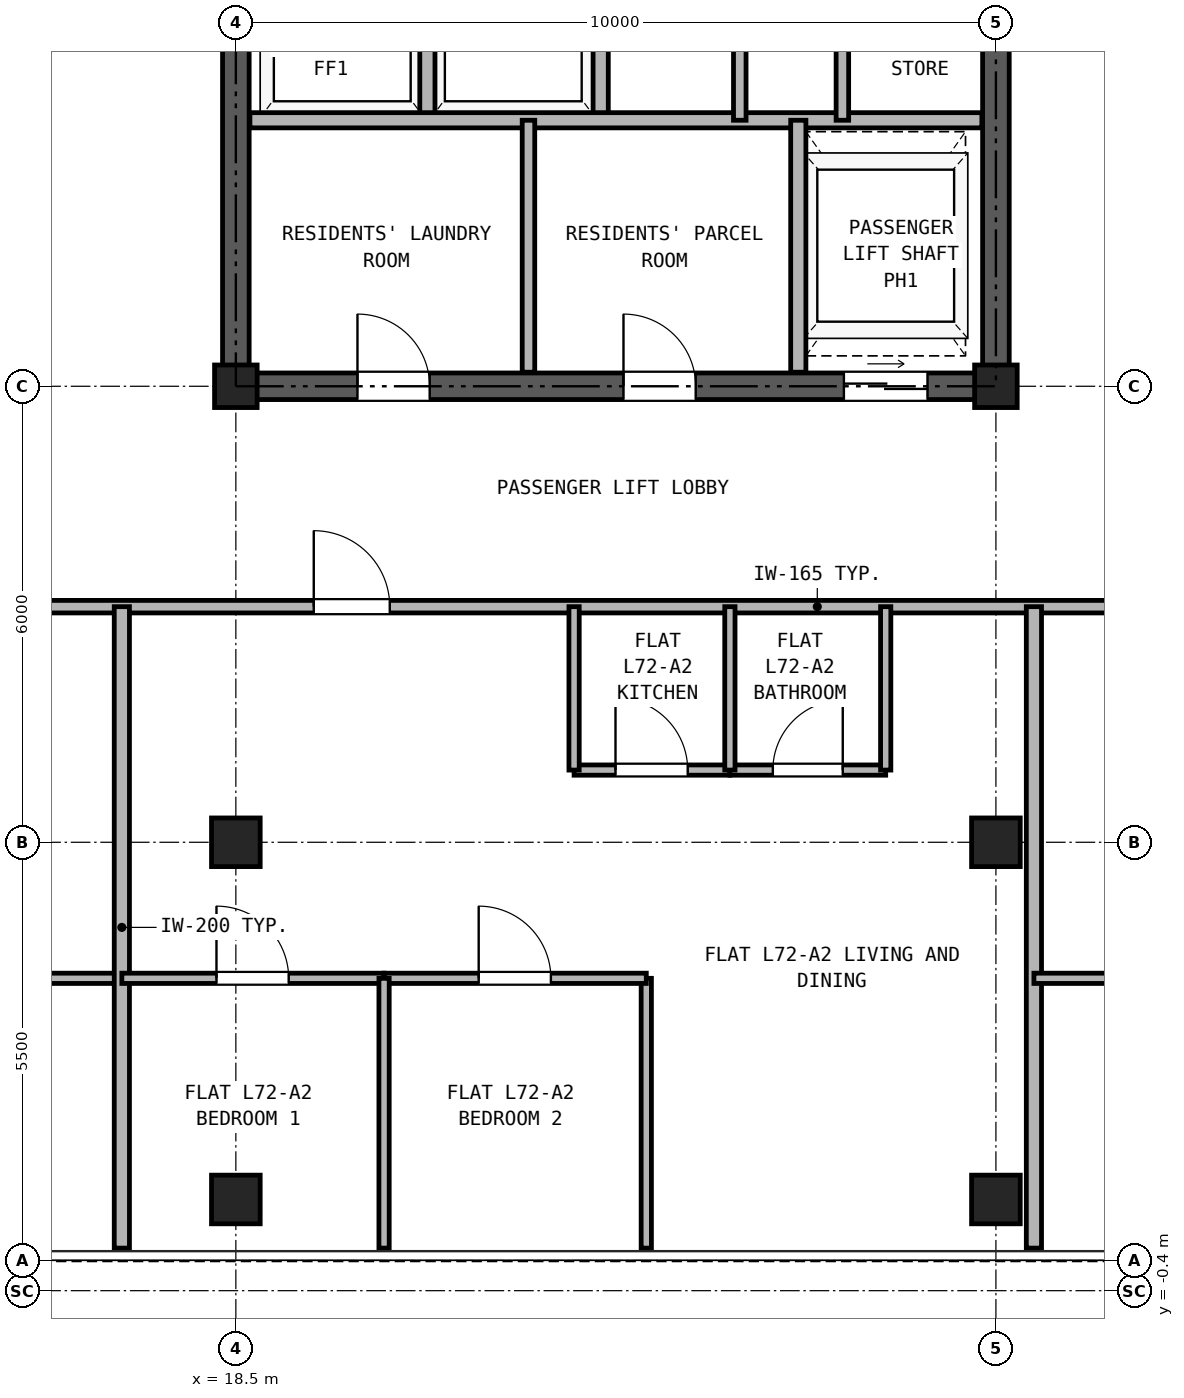
"""IFC4 building model, lengths in metres.
Left out: names, types, materials, properties, quantities, classifications, styles, units other than length and angle.
Written with IfcOpenShell. Run it as: python <this file> out.ifc"""

import sys

from ifc_helpers import new_model, si_unit, direction, frame, frame_2d, origin, origin_2d, place, context, subcontext, project, spatial, rectangle, hollow_rectangle, extrude, source, transform, mapped, element, fill, save


model = new_model("IFC4")
c1 = context("Model", 3, precision=1e-05, world=origin(), true_north=direction((0.0, 1.0)))
c2 = subcontext(c1, "Body", "Model", "MODEL_VIEW")
j1 = project(units=[si_unit("LENGTHUNIT", "METRE"), si_unit("PLANEANGLEUNIT", "RADIAN")], contexts=[c1])
p1 = place(None, origin())
s1 = spatial("IfcSite", under=j1, at=p1, CompositionType="ELEMENT")
p2 = place(p1, origin())
s2 = spatial("IfcBuilding", under=s1, at=p2, CompositionType="ELEMENT")
p3 = place(p2, frame((0.0, 0.0, 252.1)))
s3 = spatial("IfcBuildingStorey", under=s2, at=p3, CompositionType="ELEMENT", Elevation=252.1)
m1 = source(origin(), c2, "Body", "SweptSolid", [
    extrude(hollow_rectangle(XDim=0.64, YDim=0.64, WallThickness=0.035, at=origin_2d()), origin(), (0.0, 0.0, 1.0), 2.98),
])
for number, where, z_axis, x_axis in (
    (1, (18.5, 0.8, 0.0), (0.0, 0.0, 1.0), (1.0, 0.0, 0.0)),
    (2, (28.5, 0.8, 0.0), (0.0, 0.0, 1.0), (1.0, 0.0, 0.0)),
    (3, (18.5, 5.5, 0.0), (0.0, 0.0, 1.0), (1.0, 0.0, 0.0)),
):
    element("IfcColumn", number, at=place(p3, frame(where, z_axis=z_axis, x_axis=x_axis)), inside=s3, PredefinedType="COLUMN", context=c2, shape_type="MappedRepresentation", body=[
        mapped(m1, transform((0.0, 0.0, 0.0), x_axis=(1.0, 0.0, 0.0), y_axis=(0.0, 1.0, 0.0), z_axis=(0.0, 0.0, 1.0), scale=1.0)),
    ])
m2 = source(origin(), c2, "Body", "SweptSolid", [
    extrude(hollow_rectangle(XDim=0.56, YDim=0.56, WallThickness=0.03, at=origin_2d()), origin(), (0.0, 0.0, 1.0), 2.98),
])
p4 = place(p3, frame((18.5, 11.5, 0.0), z_axis=(0.0, 0.0, 1.0), x_axis=(1.0, 0.0, 0.0)))
e4 = element("IfcColumn", 4, at=p4, inside=s3, PredefinedType="COLUMN", context=c2, shape_type="MappedRepresentation", body=[
    mapped(m2, transform((0.0, 0.0, 0.0), x_axis=(1.0, 0.0, 0.0), y_axis=(0.0, 1.0, 0.0), z_axis=(0.0, 0.0, 1.0), scale=1.0)),
])
p5 = place(p3, frame((28.5, 5.5, 0.0), z_axis=(0.0, 0.0, 1.0), x_axis=(1.0, 0.0, 0.0)))
e5 = element("IfcColumn", 5, at=p5, inside=s3, PredefinedType="COLUMN", context=c2, shape_type="MappedRepresentation", body=[
    mapped(m1, transform((0.0, 0.0, 0.0), x_axis=(1.0, 0.0, 0.0), y_axis=(0.0, 1.0, 0.0), z_axis=(0.0, 0.0, 1.0), scale=1.0)),
])
p6 = place(p3, frame((28.5, 11.5, 0.0), z_axis=(0.0, 0.0, 1.0), x_axis=(1.0, 0.0, 0.0)))
e6 = element("IfcColumn", 6, at=p6, inside=s3, PredefinedType="COLUMN", context=c2, shape_type="MappedRepresentation", body=[
    mapped(m2, transform((0.0, 0.0, 0.0), x_axis=(1.0, 0.0, 0.0), y_axis=(0.0, 1.0, 0.0), z_axis=(0.0, 0.0, 1.0), scale=1.0)),
])
p7 = place(p3, frame((18.325, 11.5, 0.0), z_axis=(0.0, 0.0, 1.0), x_axis=(1.0, 0.0, 0.0)))
e7 = element("IfcWall", 7, at=p7, inside=s3, PredefinedType="SHEAR", context=c2, shape_type="SweptSolid", body=[
    extrude(rectangle(XDim=10.35, YDim=0.35, at=frame_2d((5.175, 0.0))), origin(), (0.0, 0.0, 1.0), 2.98),
])
p8 = place(p7, frame((1.775, 0.0, 0.0)))
e8 = element("IfcOpeningElement", 8, at=p8, cuts=e7, PredefinedType="OPENING", context=c2, shape_type="SweptSolid", body=[
    extrude(rectangle(XDim=0.95, YDim=2.15, at=frame_2d((0.475, 1.075))), frame((0.0, 0.185, 0.0), z_axis=(0.0, -1.0, 0.0), x_axis=(1.0, 0.0, 0.0)), (0.0, 0.0, 1.0), 0.37),
])
p9 = place(p7, frame((5.275, 0.0, 0.0)))
e9 = element("IfcOpeningElement", 9, at=p9, cuts=e7, PredefinedType="OPENING", context=c2, shape_type="SweptSolid", body=[
    extrude(rectangle(XDim=0.95, YDim=2.15, at=frame_2d((0.475, 1.075))), frame((0.0, 0.185, 0.0), z_axis=(0.0, -1.0, 0.0), x_axis=(1.0, 0.0, 0.0)), (0.0, 0.0, 1.0), 0.37),
])
p10 = place(p7, frame((8.175, 0.0, 0.0)))
e10 = element("IfcOpeningElement", 10, at=p10, cuts=e7, PredefinedType="OPENING", context=c2, shape_type="SweptSolid", body=[
    extrude(rectangle(XDim=1.1, YDim=2.25, at=frame_2d((0.55, 1.125))), frame((0.0, 0.185, 0.0), z_axis=(0.0, -1.0, 0.0), x_axis=(1.0, 0.0, 0.0)), (0.0, 0.0, 1.0), 0.37),
])
p11 = place(p3, frame((18.5, 11.675, 0.0), z_axis=(0.0, 0.0, 1.0), x_axis=(0.0, 1.0, 0.0)))
e11 = element("IfcWall", 11, at=p11, inside=s3, PredefinedType="SHEAR", context=c2, shape_type="SweptSolid", body=[
    extrude(rectangle(XDim=16.9, YDim=0.35, at=frame_2d((8.45, 0.0))), origin(), (0.0, 0.0, 1.0), 2.98),
])
p12 = place(p11, frame((7.475, 0.0, 0.0)))
e12 = element("IfcOpeningElement", 12, at=p12, cuts=e11, PredefinedType="OPENING", context=c2, shape_type="SweptSolid", body=[
    extrude(rectangle(XDim=1.15, YDim=2.2, at=frame_2d((0.575, 1.1))), frame((0.0, 0.185, 0.0), z_axis=(0.0, -1.0, 0.0), x_axis=(1.0, 0.0, 0.0)), (0.0, 0.0, 1.0), 0.37),
])
p13 = place(p3, frame((28.5, 11.675, 0.0), z_axis=(0.0, 0.0, 1.0), x_axis=(0.0, 1.0, 0.0)))
e13 = element("IfcWall", 13, at=p13, inside=s3, PredefinedType="SHEAR", context=c2, shape_type="SweptSolid", body=[
    extrude(rectangle(XDim=16.9, YDim=0.35, at=frame_2d((8.45, 0.0))), origin(), (0.0, 0.0, 1.0), 2.98),
])
p14 = place(p13, frame((7.475, 0.0, 0.0)))
e14 = element("IfcOpeningElement", 14, at=p14, cuts=e13, PredefinedType="OPENING", context=c2, shape_type="SweptSolid", body=[
    extrude(rectangle(XDim=1.15, YDim=2.2, at=frame_2d((0.575, 1.1))), frame((0.0, 0.185, 0.0), z_axis=(0.0, -1.0, 0.0), x_axis=(1.0, 0.0, 0.0)), (0.0, 0.0, 1.0), 0.37),
])
for number, where, z_axis, x_axis in (
    (15, (21.02, 15.0, 0.0), (0.0, 0.0, 1.0), (0.0, 1.0, 0.0)),
    (16, (23.3, 15.0, 0.0), (0.0, 0.0, 1.0), (0.0, 1.0, 0.0)),
):
    element("IfcWall", number, at=place(p3, frame(where, z_axis=z_axis, x_axis=x_axis)), inside=s3, PredefinedType="PARTITIONING", context=c2, shape_type="SweptSolid", body=[
        extrude(rectangle(XDim=3.0, YDim=0.2, at=frame_2d((1.5, 0.0))), origin(), (0.0, 0.0, 1.0), 2.98),
    ])
p15 = place(p3, frame((18.685, 15.0, 0.0), z_axis=(0.0, 0.0, 1.0), x_axis=(1.0, 0.0, 0.0)))
e17 = element("IfcWall", 17, at=p15, inside=s3, PredefinedType="PARTITIONING", context=c2, shape_type="SweptSolid", body=[
    extrude(rectangle(XDim=9.63, YDim=0.2, at=frame_2d((4.815, 0.0))), origin(), (0.0, 0.0, 1.0), 2.98),
])
p16 = place(p3, frame((25.13, 15.0, 0.0), z_axis=(0.0, 0.0, 1.0), x_axis=(0.0, 1.0, 0.0)))
e18 = element("IfcWall", 18, at=p16, inside=s3, PredefinedType="PARTITIONING", context=c2, shape_type="SweptSolid", body=[
    extrude(rectangle(XDim=3.0, YDim=0.165, at=frame_2d((1.5, 0.0))), origin(), (0.0, 0.0, 1.0), 2.98),
])
p17 = place(p3, frame((26.48, 15.0, 0.0), z_axis=(0.0, 0.0, 1.0), x_axis=(0.0, 1.0, 0.0)))
e19 = element("IfcWall", 19, at=p17, inside=s3, PredefinedType="PARTITIONING", context=c2, shape_type="SweptSolid", body=[
    extrude(rectangle(XDim=3.0, YDim=0.165, at=frame_2d((1.5, 0.0))), origin(), (0.0, 0.0, 1.0), 2.98),
])
p18 = place(p17, frame((1.05, 0.0, 0.0)))
e20 = element("IfcOpeningElement", 20, at=p18, cuts=e19, PredefinedType="OPENING", context=c2, shape_type="SweptSolid", body=[
    extrude(rectangle(XDim=0.9, YDim=2.05, at=frame_2d((0.45, 1.025))), frame((0.0, 0.093, 0.0), z_axis=(0.0, -1.0, 0.0), x_axis=(1.0, 0.0, 0.0)), (0.0, 0.0, 1.0), 0.185),
])
p19 = place(p3, frame((22.35, 11.685, 0.0), z_axis=(0.0, 0.0, 1.0), x_axis=(0.0, 1.0, 0.0)))
e21 = element("IfcWall", 21, at=p19, inside=s3, PredefinedType="PARTITIONING", context=c2, shape_type="SweptSolid", body=[
    extrude(rectangle(XDim=3.315, YDim=0.165, at=frame_2d((1.657, 0.0))), origin(), (0.0, 0.0, 1.0), 2.98),
])
p20 = place(p3, frame((25.9, 11.685, 0.0), z_axis=(0.0, 0.0, 1.0), x_axis=(0.0, 1.0, 0.0)))
e22 = element("IfcWall", 22, at=p20, inside=s3, PredefinedType="PARTITIONING", context=c2, shape_type="SweptSolid", body=[
    extrude(rectangle(XDim=3.315, YDim=0.2, at=frame_2d((1.657, 0.0))), origin(), (0.0, 0.0, 1.0), 2.98),
])
p21 = place(p3, frame((5.36, 8.6, 0.0), z_axis=(0.0, 0.0, 1.0), x_axis=(1.0, 0.0, 0.0)))
e23 = element("IfcWall", 23, at=p21, inside=s3, PredefinedType="PARTITIONING", context=c2, shape_type="SweptSolid", body=[
    extrude(rectangle(XDim=36.28, YDim=0.165, at=frame_2d((18.14, 0.0))), origin(), (0.0, 0.0, 1.0), 2.655),
])
p22 = place(p21, frame((8.365, 0.0, 0.0)))
e24 = element("IfcOpeningElement", 24, at=p22, cuts=e23, PredefinedType="OPENING", context=c2, shape_type="SweptSolid", body=[
    extrude(rectangle(XDim=1.0, YDim=2.15, at=frame_2d((0.5, 1.075))), frame((0.0, 0.093, 0.0), z_axis=(0.0, -1.0, 0.0), x_axis=(1.0, 0.0, 0.0)), (0.0, 0.0, 1.0), 0.185),
])
p23 = place(p21, frame((14.165, 0.0, 0.0)))
e25 = element("IfcOpeningElement", 25, at=p23, cuts=e23, PredefinedType="OPENING", context=c2, shape_type="SweptSolid", body=[
    extrude(rectangle(XDim=1.0, YDim=2.15, at=frame_2d((0.5, 1.075))), frame((0.0, 0.093, 0.0), z_axis=(0.0, -1.0, 0.0), x_axis=(1.0, 0.0, 0.0)), (0.0, 0.0, 1.0), 0.185),
])
p24 = place(p21, frame((26.415, 0.0, 0.0)))
e26 = element("IfcOpeningElement", 26, at=p24, cuts=e23, PredefinedType="OPENING", context=c2, shape_type="SweptSolid", body=[
    extrude(rectangle(XDim=1.0, YDim=2.15, at=frame_2d((0.5, 1.075))), frame((0.0, 0.093, 0.0), z_axis=(0.0, -1.0, 0.0), x_axis=(1.0, 0.0, 0.0)), (0.0, 0.0, 1.0), 0.185),
])
p25 = place(p3, frame((13.55, 3.71, 0.0), z_axis=(0.0, 0.0, 1.0), x_axis=(1.0, 0.0, 0.0)))
e27 = element("IfcWall", 27, at=p25, inside=s3, PredefinedType="PARTITIONING", context=c2, shape_type="SweptSolid", body=[
    extrude(rectangle(XDim=3.45, YDim=0.135, at=frame_2d((1.725, 0.0))), origin(), (0.0, 0.0, 1.0), 2.98),
])
p26 = place(p25, frame((1.245, 0.0, 0.0)))
e28 = element("IfcOpeningElement", 28, at=p26, cuts=e27, PredefinedType="OPENING", context=c2, shape_type="SweptSolid", body=[
    extrude(rectangle(XDim=0.95, YDim=2.15, at=frame_2d((0.475, 1.075))), frame((0.0, 0.077, 0.0), z_axis=(0.0, -1.0, 0.0), x_axis=(1.0, 0.0, 0.0)), (0.0, 0.0, 1.0), 0.155),
])
p27 = place(p3, frame((17.0, 0.16, 0.0), z_axis=(0.0, 0.0, 1.0), x_axis=(0.0, 1.0, 0.0)))
e29 = element("IfcWall", 29, at=p27, inside=s3, PredefinedType="PARTITIONING", context=c2, shape_type="SweptSolid", body=[
    extrude(rectangle(XDim=8.44, YDim=0.2, at=frame_2d((4.22, 0.0))), origin(), (0.0, 0.0, 1.0), 2.98),
])
p28 = place(p3, frame((22.95, 6.45, 0.0), z_axis=(0.0, 0.0, 1.0), x_axis=(1.0, 0.0, 0.0)))
e30 = element("IfcWall", 30, at=p28, inside=s3, PredefinedType="PARTITIONING", context=c2, shape_type="SweptSolid", body=[
    extrude(rectangle(XDim=2.05, YDim=0.135, at=frame_2d((1.025, 0.0))), origin(), (0.0, 0.0, 1.0), 2.98),
])
p29 = place(p28, frame((0.545, 0.0, 0.0)))
e31 = element("IfcOpeningElement", 31, at=p29, cuts=e30, PredefinedType="OPENING", context=c2, shape_type="SweptSolid", body=[
    extrude(rectangle(XDim=0.95, YDim=2.15, at=frame_2d((0.475, 1.075))), frame((0.0, 0.077, 0.0), z_axis=(0.0, -1.0, 0.0), x_axis=(1.0, 0.0, 0.0)), (0.0, 0.0, 1.0), 0.155),
])
p30 = place(p3, frame((25.0, 6.45, 0.0), z_axis=(0.0, 0.0, 1.0), x_axis=(1.0, 0.0, 0.0)))
e32 = element("IfcWall", 32, at=p30, inside=s3, PredefinedType="PARTITIONING", context=c2, shape_type="SweptSolid", body=[
    extrude(rectangle(XDim=2.05, YDim=0.135, at=frame_2d((1.025, 0.0))), origin(), (0.0, 0.0, 1.0), 2.98),
])
p31 = place(p30, frame((0.565, 0.0, 0.0)))
e33 = element("IfcOpeningElement", 33, at=p31, cuts=e32, PredefinedType="OPENING", context=c2, shape_type="SweptSolid", body=[
    extrude(rectangle(XDim=0.92, YDim=2.1, at=frame_2d((0.46, 1.05))), frame((0.0, 0.077, 0.0), z_axis=(0.0, -1.0, 0.0), x_axis=(1.0, 0.0, 0.0)), (0.0, 0.0, 1.0), 0.155),
])
for number, where, z_axis, x_axis in (
    (34, (22.95, 6.45, 0.0), (0.0, 0.0, 1.0), (0.0, 1.0, 0.0)),
    (35, (25.0, 6.45, 0.0), (0.0, 0.0, 1.0), (0.0, 1.0, 0.0)),
    (36, (27.05, 6.45, 0.0), (0.0, 0.0, 1.0), (0.0, 1.0, 0.0)),
):
    element("IfcWall", number, at=place(p3, frame(where, z_axis=z_axis, x_axis=x_axis)), inside=s3, PredefinedType="PARTITIONING", context=c2, shape_type="SweptSolid", body=[
        extrude(rectangle(XDim=2.15, YDim=0.135, at=frame_2d((1.075, 0.0))), origin(), (0.0, 0.0, 1.0), 2.98),
    ])
p32 = place(p3, frame((23.9, 0.16, 0.0), z_axis=(0.0, 0.0, 1.0), x_axis=(0.0, 1.0, 0.0)))
e37 = element("IfcWall", 37, at=p32, inside=s3, PredefinedType="PARTITIONING", context=c2, shape_type="SweptSolid", body=[
    extrude(rectangle(XDim=3.55, YDim=0.135, at=frame_2d((1.775, 0.0))), origin(), (0.0, 0.0, 1.0), 2.98),
])
p33 = place(p3, frame((17.0, 3.71, 0.0), z_axis=(0.0, 0.0, 1.0), x_axis=(1.0, 0.0, 0.0)))
e38 = element("IfcWall", 38, at=p33, inside=s3, PredefinedType="PARTITIONING", context=c2, shape_type="SweptSolid", body=[
    extrude(rectangle(XDim=3.45, YDim=0.135, at=frame_2d((1.725, 0.0))), origin(), (0.0, 0.0, 1.0), 2.98),
])
p34 = place(p33, frame((1.245, 0.0, 0.0)))
e39 = element("IfcOpeningElement", 39, at=p34, cuts=e38, PredefinedType="OPENING", context=c2, shape_type="SweptSolid", body=[
    extrude(rectangle(XDim=0.95, YDim=2.15, at=frame_2d((0.475, 1.075))), frame((0.0, 0.077, 0.0), z_axis=(0.0, -1.0, 0.0), x_axis=(1.0, 0.0, 0.0)), (0.0, 0.0, 1.0), 0.155),
])
p35 = place(p3, frame((20.45, 3.71, 0.0), z_axis=(0.0, 0.0, 1.0), x_axis=(1.0, 0.0, 0.0)))
e40 = element("IfcWall", 40, at=p35, inside=s3, PredefinedType="PARTITIONING", context=c2, shape_type="SweptSolid", body=[
    extrude(rectangle(XDim=3.45, YDim=0.135, at=frame_2d((1.725, 0.0))), origin(), (0.0, 0.0, 1.0), 2.98),
])
p36 = place(p35, frame((1.245, 0.0, 0.0)))
e41 = element("IfcOpeningElement", 41, at=p36, cuts=e40, PredefinedType="OPENING", context=c2, shape_type="SweptSolid", body=[
    extrude(rectangle(XDim=0.95, YDim=2.15, at=frame_2d((0.475, 1.075))), frame((0.0, 0.077, 0.0), z_axis=(0.0, -1.0, 0.0), x_axis=(1.0, 0.0, 0.0)), (0.0, 0.0, 1.0), 0.155),
])
p37 = place(p3, frame((20.45, 0.16, 0.0), z_axis=(0.0, 0.0, 1.0), x_axis=(0.0, 1.0, 0.0)))
e42 = element("IfcWall", 42, at=p37, inside=s3, PredefinedType="PARTITIONING", context=c2, shape_type="SweptSolid", body=[
    extrude(rectangle(XDim=3.55, YDim=0.135, at=frame_2d((1.775, 0.0))), origin(), (0.0, 0.0, 1.0), 2.98),
])
p38 = place(p3, frame((29.0, 0.16, 0.0), z_axis=(0.0, 0.0, 1.0), x_axis=(0.0, 1.0, 0.0)))
e43 = element("IfcWall", 43, at=p38, inside=s3, PredefinedType="PARTITIONING", context=c2, shape_type="SweptSolid", body=[
    extrude(rectangle(XDim=8.44, YDim=0.2, at=frame_2d((4.22, 0.0))), origin(), (0.0, 0.0, 1.0), 2.98),
])
p39 = place(p3, frame((29.0, 3.71, 0.0), z_axis=(0.0, 0.0, 1.0), x_axis=(1.0, 0.0, 0.0)))
e44 = element("IfcWall", 44, at=p39, inside=s3, PredefinedType="PARTITIONING", context=c2, shape_type="SweptSolid", body=[
    extrude(rectangle(XDim=5.549, YDim=0.135, at=frame_2d((2.774, 0.0))), origin(), (0.0, 0.0, 1.0), 2.98),
])
p40 = place(p39, frame((2.294, 0.0, 0.0)))
e45 = element("IfcOpeningElement", 45, at=p40, cuts=e44, PredefinedType="OPENING", context=c2, shape_type="SweptSolid", body=[
    extrude(rectangle(XDim=0.95, YDim=2.15, at=frame_2d((0.475, 1.075))), frame((0.0, 0.077, 0.0), z_axis=(0.0, -1.0, 0.0), x_axis=(1.0, 0.0, 0.0)), (0.0, 0.0, 1.0), 0.155),
])
p41 = place(p8, frame((0.95, 0.0, 0.0), z_axis=(0.0, 0.0, 1.0), x_axis=(-1.0, 0.0, 0.0)))
e46 = element("IfcDoor", 46, at=p41, inside=s3, OperationType="SINGLE_SWING_LEFT", PredefinedType="DOOR", context=c2, shape_type="SweptSolid", body=[
    extrude(rectangle(XDim=0.95, YDim=2.15, at=frame_2d((0.475, 1.075))), frame((0.0, 0.025, 0.0), z_axis=(0.0, -1.0, 0.0), x_axis=(1.0, 0.0, 0.0)), (0.0, 0.0, 1.0), 0.05),
])
fill(e8, e46)
p42 = place(p9, frame((0.95, 0.0, 0.0), z_axis=(0.0, 0.0, 1.0), x_axis=(-1.0, 0.0, 0.0)))
e47 = element("IfcDoor", 47, at=p42, inside=s3, OperationType="SINGLE_SWING_LEFT", PredefinedType="DOOR", context=c2, shape_type="SweptSolid", body=[
    extrude(rectangle(XDim=0.95, YDim=2.15, at=frame_2d((0.475, 1.075))), frame((0.0, 0.025, 0.0), z_axis=(0.0, -1.0, 0.0), x_axis=(1.0, 0.0, 0.0)), (0.0, 0.0, 1.0), 0.05),
])
fill(e9, e47)
p43 = place(p10, frame((1.1, 0.0, 0.0), z_axis=(0.0, 0.0, 1.0), x_axis=(-1.0, 0.0, 0.0)))
e48 = element("IfcDoor", 48, at=p43, inside=s3, OperationType="DOUBLE_DOOR_SLIDING", PredefinedType="DOOR", context=c2, shape_type="SweptSolid", body=[
    extrude(rectangle(XDim=1.1, YDim=2.25, at=frame_2d((0.55, 1.125))), frame((0.0, 0.025, 0.0), z_axis=(0.0, -1.0, 0.0), x_axis=(1.0, 0.0, 0.0)), (0.0, 0.0, 1.0), 0.05),
])
fill(e10, e48)
p44 = place(p29, origin())
e49 = element("IfcDoor", 49, at=p44, inside=s3, OperationType="SINGLE_SWING_LEFT", PredefinedType="DOOR", context=c2, shape_type="SweptSolid", body=[
    extrude(rectangle(XDim=0.95, YDim=2.15, at=frame_2d((0.475, 1.075))), frame((0.0, 0.025, 0.0), z_axis=(0.0, -1.0, 0.0), x_axis=(1.0, 0.0, 0.0)), (0.0, 0.0, 1.0), 0.05),
])
fill(e31, e49)
p45 = place(p31, origin())
e50 = element("IfcDoor", 50, at=p45, inside=s3, OperationType="SINGLE_SWING_RIGHT", PredefinedType="DOOR", context=c2, shape_type="SweptSolid", body=[
    extrude(rectangle(XDim=0.92, YDim=2.1, at=frame_2d((0.46, 1.05))), frame((0.0, 0.025, 0.0), z_axis=(0.0, -1.0, 0.0), x_axis=(1.0, 0.0, 0.0)), (0.0, 0.0, 1.0), 0.05),
])
fill(e33, e50)
p46 = place(p34, frame((0.95, 0.0, 0.0), z_axis=(0.0, 0.0, 1.0), x_axis=(-1.0, 0.0, 0.0)))
e51 = element("IfcDoor", 51, at=p46, inside=s3, OperationType="SINGLE_SWING_LEFT", PredefinedType="DOOR", context=c2, shape_type="SweptSolid", body=[
    extrude(rectangle(XDim=0.95, YDim=2.15, at=frame_2d((0.475, 1.075))), frame((0.0, 0.025, 0.0), z_axis=(0.0, -1.0, 0.0), x_axis=(1.0, 0.0, 0.0)), (0.0, 0.0, 1.0), 0.05),
])
fill(e39, e51)
p47 = place(p36, frame((0.95, 0.0, 0.0), z_axis=(0.0, 0.0, 1.0), x_axis=(-1.0, 0.0, 0.0)))
e52 = element("IfcDoor", 52, at=p47, inside=s3, OperationType="SINGLE_SWING_LEFT", PredefinedType="DOOR", context=c2, shape_type="SweptSolid", body=[
    extrude(rectangle(XDim=0.95, YDim=2.15, at=frame_2d((0.475, 1.075))), frame((0.0, 0.025, 0.0), z_axis=(0.0, -1.0, 0.0), x_axis=(1.0, 0.0, 0.0)), (0.0, 0.0, 1.0), 0.05),
])
fill(e41, e52)
p48 = place(p23, frame((1.0, 0.0, 0.0), z_axis=(0.0, 0.0, 1.0), x_axis=(-1.0, 0.0, 0.0)))
e53 = element("IfcDoor", 53, at=p48, inside=s3, OperationType="SINGLE_SWING_LEFT", PredefinedType="DOOR", context=c2, shape_type="SweptSolid", body=[
    extrude(rectangle(XDim=1.0, YDim=2.15, at=frame_2d((0.5, 1.075))), frame((0.0, 0.025, 0.0), z_axis=(0.0, -1.0, 0.0), x_axis=(1.0, 0.0, 0.0)), (0.0, 0.0, 1.0), 0.05),
])
fill(e25, e53)
save(model, sys.argv[1])
